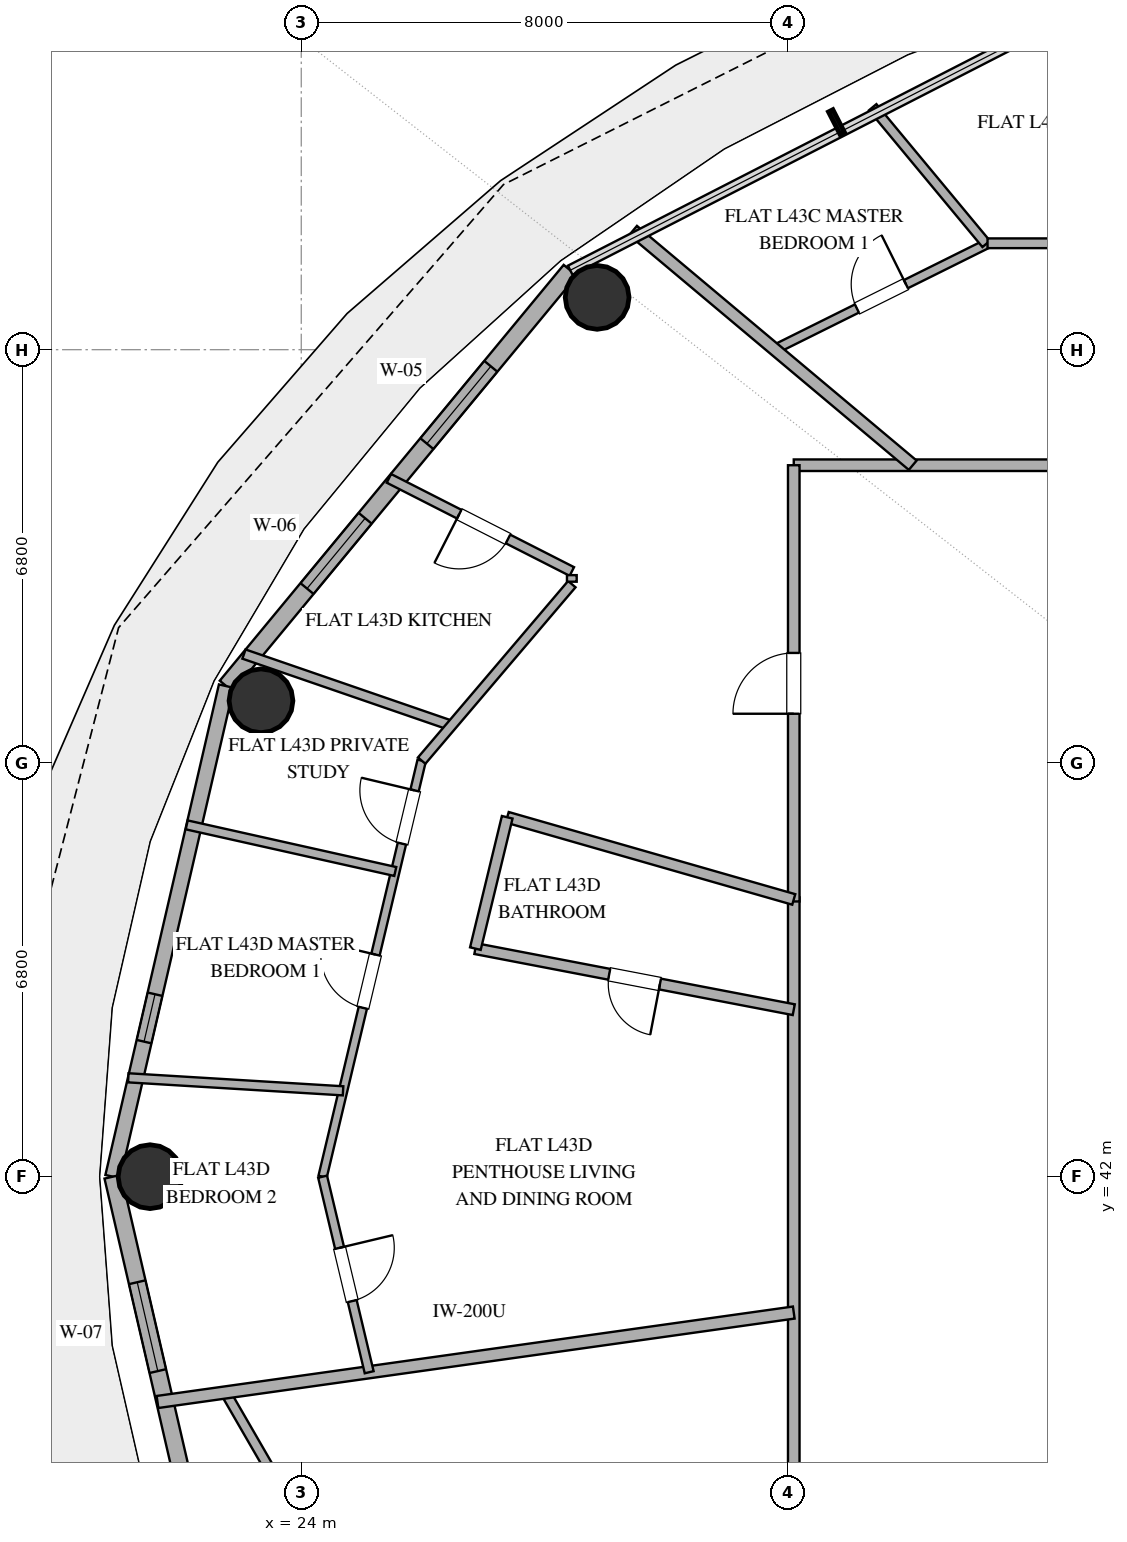
"""IFC4 building model, lengths in metres.
Left out: names, types, materials, properties, quantities, classifications, styles, units other than length and angle.
Written with IfcOpenShell. Run it as: python <this file> out.ifc"""

import sys

from ifc_helpers import new_model, si_unit, direction, frame, frame_2d, origin, origin_2d, place, context, subcontext, project, spatial, rectangle, hollow_circle, extrude, element, fill, save


model = new_model("IFC4")
c1 = context("Model", 3, precision=1e-05, world=origin(), true_north=direction((0.0, 1.0)))
c2 = subcontext(c1, "Body", "Model", "MODEL_VIEW")
j1 = project(units=[si_unit("LENGTHUNIT", "METRE"), si_unit("PLANEANGLEUNIT", "RADIAN")], contexts=[c1])
p1 = place(None, origin())
s1 = spatial("IfcSite", under=j1, at=p1, CompositionType="ELEMENT")
p2 = place(p1, origin())
s2 = spatial("IfcBuilding", under=s1, at=p2, CompositionType="ELEMENT")
p3 = place(p2, frame((0.0, 0.0, 172.2)))
s3 = spatial("IfcBuildingStorey", under=s2, at=p3, CompositionType="ELEMENT", Elevation=172.2)
for number, where, z_axis, x_axis in (
    (1, (28.866, 56.46, 0.0), (0.0, 0.0, 1.0), (1.0, 0.0, 0.0)),
    (2, (23.338, 49.826, 0.0), (0.0, 0.0, 1.0), (1.0, 0.0, 0.0)),
    (3, (21.513, 42.0, 0.0), (0.0, 0.0, 1.0), (1.0, 0.0, 0.0)),
):
    element("IfcColumn", number, at=place(p3, frame(where, z_axis=z_axis, x_axis=x_axis)), inside=s3, PredefinedType="COLUMN", context=c2, shape_type="SweptSolid", body=[
        extrude(hollow_circle(Radius=0.525, WallThickness=0.028, at=origin_2d()), origin(), (0.0, 0.0, 1.0), 3.38),
    ])
p4 = place(p3, frame((28.424, 56.906, 0.0), z_axis=(0.0, 0.0, 1.0), x_axis=(-0.637333477683, -0.770588111915, 0.0)))
e4 = element("IfcWall", 4, at=p4, inside=s3, PredefinedType="SOLIDWALL", context=c2, shape_type="SweptSolid", body=[
    extrude(rectangle(XDim=8.875, YDim=0.28, at=frame_2d((4.438, 0.0))), origin(), (0.0, 0.0, 1.0), 3.38),
])
p5 = place(p4, frame((2.049, 0.0, 0.85)))
e5 = element("IfcOpeningElement", 5, at=p5, cuts=e4, PredefinedType="OPENING", context=c2, shape_type="SweptSolid", body=[
    extrude(rectangle(XDim=1.65, YDim=2.0, at=frame_2d((0.825, 1.0))), frame((0.0, 0.15, 0.0), z_axis=(0.0, -1.0, 0.0), x_axis=(1.0, 0.0, 0.0)), (0.0, 0.0, 1.0), 0.3),
])
p6 = place(p4, frame((5.292, 0.0, 0.85)))
e6 = element("IfcOpeningElement", 6, at=p6, cuts=e4, PredefinedType="OPENING", context=c2, shape_type="SweptSolid", body=[
    extrude(rectangle(XDim=1.5, YDim=2.0, at=frame_2d((0.75, 1.0))), frame((0.0, 0.15, 0.0), z_axis=(0.0, -1.0, 0.0), x_axis=(1.0, 0.0, 0.0)), (0.0, 0.0, 1.0), 0.3),
])
p7 = place(p3, frame((22.768, 50.067, 0.0), z_axis=(0.0, 0.0, 1.0), x_axis=(-0.225473184558, -0.974249374157, 0.0)))
e7 = element("IfcWall", 7, at=p7, inside=s3, PredefinedType="SOLIDWALL", context=c2, shape_type="SweptSolid", body=[
    extrude(rectangle(XDim=8.28, YDim=0.25, at=frame_2d((4.14, 0.0))), origin(), (0.0, 0.0, 1.0), 3.38),
])
p8 = place(p7, frame((5.2, 0.0, 1.54)))
e8 = element("IfcOpeningElement", 8, at=p8, cuts=e7, PredefinedType="OPENING", context=c2, shape_type="SweptSolid", body=[
    extrude(rectangle(XDim=0.8, YDim=1.0, at=frame_2d((0.4, 0.5))), frame((0.0, 0.135, 0.0), z_axis=(0.0, -1.0, 0.0), x_axis=(1.0, 0.0, 0.0)), (0.0, 0.0, 1.0), 0.27),
])
p9 = place(p3, frame((20.901, 42.0, 0.0), z_axis=(0.0, 0.0, 1.0), x_axis=(0.225473184558, -0.974249374157, 0.0)))
e9 = element("IfcWall", 9, at=p9, inside=s3, PredefinedType="SOLIDWALL", context=c2, shape_type="SweptSolid", body=[
    extrude(rectangle(XDim=8.28, YDim=0.28, at=frame_2d((4.14, 0.0))), origin(), (0.0, 0.0, 1.0), 3.38),
])
p10 = place(p9, frame((1.782, 0.0, 0.85)))
e10 = element("IfcOpeningElement", 10, at=p10, cuts=e9, PredefinedType="OPENING", context=c2, shape_type="SweptSolid", body=[
    extrude(rectangle(XDim=1.5, YDim=1.8, at=frame_2d((0.75, 0.9))), frame((0.0, 0.15, 0.0), z_axis=(0.0, -1.0, 0.0), x_axis=(1.0, 0.0, 0.0)), (0.0, 0.0, 1.0), 0.3),
])
p11 = place(p9, frame((5.344, 0.0, 0.0)))
e11 = element("IfcOpeningElement", 11, at=p11, cuts=e9, PredefinedType="OPENING", context=c2, shape_type="SweptSolid", body=[
    extrude(rectangle(XDim=1.4, YDim=2.2, at=frame_2d((0.7, 1.1))), frame((0.0, 0.15, 0.0), z_axis=(0.0, -1.0, 0.0), x_axis=(1.0, 0.0, 0.0)), (0.0, 0.0, 1.0), 0.3),
])
p12 = place(p3, frame((32.1, 53.7, 0.0), z_axis=(0.0, 0.0, 1.0), x_axis=(1.0, 0.0, 0.0)))
e12 = element("IfcWall", 12, at=p12, inside=s3, PredefinedType="PARTITIONING", context=c2, shape_type="SweptSolid", body=[
    extrude(rectangle(XDim=16.061, YDim=0.19, at=frame_2d((8.03, 0.0))), origin(), (0.0, 0.0, 1.0), 2.74),
])
p13 = place(p12, frame((6.907, 0.0, 0.0)))
e13 = element("IfcOpeningElement", 13, at=p13, cuts=e12, PredefinedType="OPENING", context=c2, shape_type="SweptSolid", body=[
    extrude(rectangle(XDim=1.0, YDim=2.2, at=frame_2d((0.5, 1.1))), frame((0.0, 0.105, 0.0), z_axis=(0.0, -1.0, 0.0), x_axis=(1.0, 0.0, 0.0)), (0.0, 0.0, 1.0), 0.21),
])
p14 = place(p3, frame((22.753, 38.452, 0.0), z_axis=(0.0, 0.0, 1.0), x_axis=(0.500584533727, -0.865687659952, 0.0)))
e14 = element("IfcWall", 14, at=p14, inside=s3, PredefinedType="PLUMBINGWALL", context=c2, shape_type="SweptSolid", body=[
    extrude(rectangle(XDim=9.567, YDim=0.16, at=frame_2d((4.783, 0.0))), origin(), (0.0, 0.0, 1.0), 2.74),
])
p15 = place(p14, frame((5.233, 0.0, 0.0)))
e15 = element("IfcOpeningElement", 15, at=p15, cuts=e14, PredefinedType="OPENING", context=c2, shape_type="SweptSolid", body=[
    extrude(rectangle(XDim=0.9, YDim=2.1, at=frame_2d((0.45, 1.05))), frame((0.0, 0.09, 0.0), z_axis=(0.0, -1.0, 0.0), x_axis=(1.0, 0.0, 0.0)), (0.0, 0.0, 1.0), 0.18),
])
p16 = place(p3, frame((32.1, 46.593, 0.0), z_axis=(0.0, 0.0, 1.0), x_axis=(0.0, -1.0, 0.0)))
e16 = element("IfcWall", 16, at=p16, inside=s3, PredefinedType="PARTITIONING", context=c2, shape_type="SweptSolid", body=[
    extrude(rectangle(XDim=16.292, YDim=0.19, at=frame_2d((8.146, 0.0))), origin(), (0.0, 0.0, 1.0), 2.74),
])
p17 = place(p3, frame((32.1, 46.526, 0.0), z_axis=(0.0, 0.0, 1.0), x_axis=(0.0, 1.0, 0.0)))
e17 = element("IfcWall", 17, at=p17, inside=s3, PredefinedType="PARTITIONING", context=c2, shape_type="SweptSolid", body=[
    extrude(rectangle(XDim=7.174, YDim=0.19, at=frame_2d((3.587, 0.0))), origin(), (0.0, 0.0, 1.0), 2.74),
])
p18 = place(p17, frame((3.087, 0.0, 0.0)))
e18 = element("IfcOpeningElement", 18, at=p18, cuts=e17, PredefinedType="OPENING", context=c2, shape_type="SweptSolid", body=[
    extrude(rectangle(XDim=1.0, YDim=2.2, at=frame_2d((0.5, 1.1))), frame((0.0, 0.105, 0.0), z_axis=(0.0, -1.0, 0.0), x_axis=(1.0, 0.0, 0.0)), (0.0, 0.0, 1.0), 0.21),
])
p19 = place(p3, frame((21.635, 38.295, 0.0), z_axis=(0.0, 0.0, 1.0), x_axis=(0.990268074466, 0.139173060229, 0.0)))
e19 = element("IfcWall", 19, at=p19, inside=s3, PredefinedType="PARTITIONING", context=c2, shape_type="SweptSolid", body=[
    extrude(rectangle(XDim=10.567, YDim=0.2, at=frame_2d((5.284, 0.0))), origin(), (0.0, 0.0, 1.0), 2.74),
])
p20 = place(p3, frame((32.1, 44.746, 0.0), z_axis=(0.0, 0.0, 1.0), x_axis=(-0.982104947805, 0.188334467098, 0.0)))
e20 = element("IfcWall", 20, at=p20, inside=s3, PredefinedType="PLUMBINGWALL", context=c2, shape_type="SweptSolid", body=[
    extrude(rectangle(XDim=5.332, YDim=0.18, at=frame_2d((2.666, 0.0))), origin(), (0.0, 0.0, 1.0), 2.74),
])
p21 = place(p20, frame((2.241, 0.0, 0.0)))
e21 = element("IfcOpeningElement", 21, at=p21, cuts=e20, PredefinedType="OPENING", context=c2, shape_type="SweptSolid", body=[
    extrude(rectangle(XDim=0.85, YDim=2.1, at=frame_2d((0.425, 1.05))), frame((0.0, 0.1, 0.0), z_axis=(0.0, -1.0, 0.0), x_axis=(1.0, 0.0, 0.0)), (0.0, 0.0, 1.0), 0.2),
])
p22 = place(p3, frame((27.387, 47.911, 0.0), z_axis=(0.0, 0.0, 1.0), x_axis=(0.961266088446, -0.27562203686, 0.0)))
e22 = element("IfcWall", 22, at=p22, inside=s3, PredefinedType="PLUMBINGWALL", context=c2, shape_type="SweptSolid", body=[
    extrude(rectangle(XDim=4.903, YDim=0.18, at=frame_2d((2.451, 0.0))), origin(), (0.0, 0.0, 1.0), 2.74),
])
p23 = place(p3, frame((31.786, 55.605, 0.0), z_axis=(0.0, 0.0, 1.0), x_axis=(0.895458573673, 0.445144856013, 0.0)))
e23 = element("IfcWall", 23, at=p23, inside=s3, PredefinedType="PARTITIONING", context=c2, shape_type="SweptSolid", body=[
    extrude(rectangle(XDim=3.92, YDim=0.15, at=frame_2d((1.96, 0.0))), origin(), (0.0, 0.0, 1.0), 2.74),
])
p24 = place(p23, frame((1.51, 0.0, 0.0)))
e24 = element("IfcOpeningElement", 24, at=p24, cuts=e23, PredefinedType="OPENING", context=c2, shape_type="SweptSolid", body=[
    extrude(rectangle(XDim=0.9, YDim=2.1, at=frame_2d((0.45, 1.05))), frame((0.0, 0.085, 0.0), z_axis=(0.0, -1.0, 0.0), x_axis=(1.0, 0.0, 0.0)), (0.0, 0.0, 1.0), 0.17),
])
p25 = place(p3, frame((24.351, 42.0, 0.0), z_axis=(0.0, 0.0, 1.0), x_axis=(0.231658068135, 0.972797275627, 0.0)))
e25 = element("IfcWall", 25, at=p25, inside=s3, PredefinedType="PARTITIONING", context=c2, shape_type="SweptSolid", body=[
    extrude(rectangle(XDim=7.034, YDim=0.14, at=frame_2d((3.517, 0.0))), origin(), (0.0, 0.0, 1.0), 2.74),
])
p26 = place(p25, frame((2.855, 0.0, 0.0)))
e26 = element("IfcOpeningElement", 26, at=p26, cuts=e25, PredefinedType="OPENING", context=c2, shape_type="SweptSolid", body=[
    extrude(rectangle(XDim=0.9, YDim=2.1, at=frame_2d((0.45, 1.05))), frame((0.0, 0.08, 0.0), z_axis=(0.0, -1.0, 0.0), x_axis=(1.0, 0.0, 0.0)), (0.0, 0.0, 1.0), 0.16),
])
p27 = place(p25, frame((5.63, 0.0, 0.0)))
e27 = element("IfcOpeningElement", 27, at=p27, cuts=e25, PredefinedType="OPENING", context=c2, shape_type="SweptSolid", body=[
    extrude(rectangle(XDim=0.9, YDim=2.1, at=frame_2d((0.45, 1.05))), frame((0.0, 0.08, 0.0), z_axis=(0.0, -1.0, 0.0), x_axis=(1.0, 0.0, 0.0)), (0.0, 0.0, 1.0), 0.16),
])
p28 = place(p3, frame((26.471, 49.418, 0.0), z_axis=(0.0, 0.0, 1.0), x_axis=(-0.945442677411, 0.325788495392, 0.0)))
e28 = element("IfcWall", 28, at=p28, inside=s3, PredefinedType="PLUMBINGWALL", context=c2, shape_type="SweptSolid", body=[
    extrude(rectangle(XDim=3.61, YDim=0.16, at=frame_2d((1.805, 0.0))), origin(), (0.0, 0.0, 1.0), 2.74),
])
p29 = place(p3, frame((21.156, 43.626, 0.0), z_axis=(0.0, 0.0, 1.0), x_axis=(0.998171777701, -0.060440898408, 0.0)))
e29 = element("IfcWall", 29, at=p29, inside=s3, PredefinedType="PARTITIONING", context=c2, shape_type="SweptSolid", body=[
    extrude(rectangle(XDim=3.538, YDim=0.15, at=frame_2d((1.769, 0.0))), origin(), (0.0, 0.0, 1.0), 2.74),
])
p30 = place(p3, frame((25.546, 47.019, 0.0), z_axis=(0.0, 0.0, 1.0), x_axis=(-0.975921546644, 0.218121834754, 0.0)))
e30 = element("IfcWall", 30, at=p30, inside=s3, PredefinedType="PARTITIONING", context=c2, shape_type="SweptSolid", body=[
    extrude(rectangle(XDim=3.515, YDim=0.15, at=frame_2d((1.757, 0.0))), origin(), (0.0, 0.0, 1.0), 2.74),
])
p31 = place(p3, frame((28.45, 51.952, 0.0), z_axis=(0.0, 0.0, 1.0), x_axis=(-0.891148759763, 0.453711238535, 0.0)))
e31 = element("IfcWall", 31, at=p31, inside=s3, PredefinedType="PLUMBINGWALL", context=c2, shape_type="SweptSolid", body=[
    extrude(rectangle(XDim=3.375, YDim=0.16, at=frame_2d((1.688, 0.0))), origin(), (0.0, 0.0, 1.0), 2.74),
])
p32 = place(p31, frame((1.178, 0.0, 0.0)))
e32 = element("IfcOpeningElement", 32, at=p32, cuts=e31, PredefinedType="OPENING", context=c2, shape_type="SweptSolid", body=[
    extrude(rectangle(XDim=0.9, YDim=2.1, at=frame_2d((0.45, 1.05))), frame((0.0, 0.09, 0.0), z_axis=(0.0, -1.0, 0.0), x_axis=(1.0, 0.0, 0.0)), (0.0, 0.0, 1.0), 0.18),
])
p33 = place(p3, frame((24.351, 42.0, 0.0), z_axis=(0.0, 0.0, 1.0), x_axis=(0.231590575549, -0.972813345569, 0.0)))
e33 = element("IfcWall", 33, at=p33, inside=s3, PredefinedType="PARTITIONING", context=c2, shape_type="SweptSolid", body=[
    extrude(rectangle(XDim=3.306, YDim=0.15, at=frame_2d((1.653, 0.0))), origin(), (0.0, 0.0, 1.0), 2.74),
])
p34 = place(p33, frame((1.203, 0.0, 0.0)))
e34 = element("IfcOpeningElement", 34, at=p34, cuts=e33, PredefinedType="OPENING", context=c2, shape_type="SweptSolid", body=[
    extrude(rectangle(XDim=0.9, YDim=2.1, at=frame_2d((0.45, 1.05))), frame((0.0, 0.085, 0.0), z_axis=(0.0, -1.0, 0.0), x_axis=(1.0, 0.0, 0.0)), (0.0, 0.0, 1.0), 0.17),
])
p35 = place(p3, frame((25.981, 48.842, 0.0), z_axis=(0.0, 0.0, 1.0), x_axis=(0.648022171798, 0.761621470849, 0.0)))
e35 = element("IfcWall", 35, at=p35, inside=s3, PredefinedType="PLUMBINGWALL", context=c2, shape_type="SweptSolid", body=[
    extrude(rectangle(XDim=3.81, YDim=0.16, at=frame_2d((1.905, 0.0))), origin(), (0.0, 0.0, 1.0), 2.74),
])
p36 = place(p3, frame((34.056, 53.7, 0.0), z_axis=(0.0, 0.0, 1.0), x_axis=(-0.766037176398, 0.642796269728, 0.0)))
e36 = element("IfcWall", 36, at=p36, inside=s3, PredefinedType="PARTITIONING", context=c2, shape_type="SweptSolid", body=[
    extrude(rectangle(XDim=6.004, YDim=0.2, at=frame_2d((3.002, 0.0))), origin(), (0.0, 0.0, 1.0), 2.74),
])
p37 = place(p3, frame((35.264, 57.339, 0.0), z_axis=(0.0, 0.0, 1.0), x_axis=(-0.638753509407, 0.769411433643, 0.0)))
e37 = element("IfcWall", 37, at=p37, inside=s3, PredefinedType="PLUMBINGWALL", context=c2, shape_type="SweptSolid", body=[
    extrude(rectangle(XDim=2.922, YDim=0.16, at=frame_2d((1.461, 0.0))), origin(), (0.0, 0.0, 1.0), 2.74),
])
p38 = place(p3, frame((26.864, 45.75, 0.0), z_axis=(0.0, 0.0, 1.0), x_axis=(0.235499423966, 0.971874488456, 0.0)))
e38 = element("IfcWall", 38, at=p38, inside=s3, PredefinedType="PLUMBINGWALL", context=c2, shape_type="SweptSolid", body=[
    extrude(rectangle(XDim=2.223, YDim=0.18, at=frame_2d((1.111, 0.0))), origin(), (0.0, 0.0, 1.0), 2.74),
])
p39 = place(p3, frame((36.349, 57.35, 0.0), z_axis=(0.0, 0.0, 1.0), x_axis=(-1.0, 0.0, 0.0)))
e39 = element("IfcWall", 39, at=p39, inside=s3, PredefinedType="PLUMBINGWALL", context=c2, shape_type="SweptSolid", body=[
    extrude(rectangle(XDim=1.062, YDim=0.16, at=frame_2d((0.531, 0.0))), origin(), (0.0, 0.0, 1.0), 2.74),
])
p40 = place(p3, frame((28.45, 51.784, 0.0), z_axis=(0.0, 0.0, 1.0), x_axis=(0.0, 1.0, 0.0)))
e40 = element("IfcWall", 40, at=p40, inside=s3, PredefinedType="PLUMBINGWALL", context=c2, shape_type="SweptSolid", body=[
    extrude(rectangle(XDim=0.108, YDim=0.16, at=frame_2d((0.054, 0.0))), origin(), (0.0, 0.0, 1.0), 2.74),
])
p41 = place(p5, origin())
e41 = element("IfcWindow", 41, at=p41, inside=s3, PartitioningType="SINGLE_PANEL", PredefinedType="WINDOW", context=c2, shape_type="SweptSolid", body=[
    extrude(rectangle(XDim=1.65, YDim=2.0, at=frame_2d((0.825, 1.0))), frame((0.0, 0.03, 0.0), z_axis=(0.0, -1.0, 0.0), x_axis=(1.0, 0.0, 0.0)), (0.0, 0.0, 1.0), 0.06),
])
fill(e5, e41)
p42 = place(p6, origin())
e42 = element("IfcWindow", 42, at=p42, inside=s3, PartitioningType="SINGLE_PANEL", PredefinedType="WINDOW", context=c2, shape_type="SweptSolid", body=[
    extrude(rectangle(XDim=1.5, YDim=2.0, at=frame_2d((0.75, 1.0))), frame((0.0, 0.03, 0.0), z_axis=(0.0, -1.0, 0.0), x_axis=(1.0, 0.0, 0.0)), (0.0, 0.0, 1.0), 0.06),
])
fill(e6, e42)
p43 = place(p10, origin())
e43 = element("IfcWindow", 43, at=p43, inside=s3, PartitioningType="SINGLE_PANEL", PredefinedType="WINDOW", context=c2, shape_type="SweptSolid", body=[
    extrude(rectangle(XDim=1.5, YDim=1.8, at=frame_2d((0.75, 0.9))), frame((0.0, 0.03, 0.0), z_axis=(0.0, -1.0, 0.0), x_axis=(1.0, 0.0, 0.0)), (0.0, 0.0, 1.0), 0.06),
])
fill(e10, e43)
p44 = place(p8, origin())
e44 = element("IfcWindow", 44, at=p44, inside=s3, PartitioningType="SINGLE_PANEL", PredefinedType="WINDOW", context=c2, shape_type="SweptSolid", body=[
    extrude(rectangle(XDim=0.8, YDim=1.0, at=frame_2d((0.4, 0.5))), frame((0.0, 0.03, 0.0), z_axis=(0.0, -1.0, 0.0), x_axis=(1.0, 0.0, 0.0)), (0.0, 0.0, 1.0), 0.06),
])
fill(e8, e44)
p45 = place(p18, origin())
e45 = element("IfcDoor", 45, at=p45, inside=s3, OperationType="SINGLE_SWING_LEFT", PredefinedType="DOOR", context=c2, shape_type="SweptSolid", body=[
    extrude(rectangle(XDim=1.0, YDim=2.2, at=frame_2d((0.5, 1.1))), frame((0.0, 0.025, 0.0), z_axis=(0.0, -1.0, 0.0), x_axis=(1.0, 0.0, 0.0)), (0.0, 0.0, 1.0), 0.05),
])
fill(e18, e45)
p46 = place(p21, origin())
e46 = element("IfcDoor", 46, at=p46, inside=s3, OperationType="SINGLE_SWING_LEFT", PredefinedType="DOOR", context=c2, shape_type="SweptSolid", body=[
    extrude(rectangle(XDim=0.85, YDim=2.1, at=frame_2d((0.425, 1.05))), frame((0.0, 0.025, 0.0), z_axis=(0.0, -1.0, 0.0), x_axis=(1.0, 0.0, 0.0)), (0.0, 0.0, 1.0), 0.05),
])
fill(e21, e46)
p47 = place(p24, origin())
e47 = element("IfcDoor", 47, at=p47, inside=s3, OperationType="SINGLE_SWING_RIGHT", PredefinedType="DOOR", context=c2, shape_type="SweptSolid", body=[
    extrude(rectangle(XDim=0.9, YDim=2.1, at=frame_2d((0.45, 1.05))), frame((0.0, 0.025, 0.0), z_axis=(0.0, -1.0, 0.0), x_axis=(1.0, 0.0, 0.0)), (0.0, 0.0, 1.0), 0.05),
])
fill(e24, e47)
p48 = place(p26, origin())
e48 = element("IfcDoor", 48, at=p48, inside=s3, OperationType="SINGLE_SWING_RIGHT", PredefinedType="DOOR", context=c2, shape_type="SweptSolid", body=[
    extrude(rectangle(XDim=0.9, YDim=2.1, at=frame_2d((0.45, 1.05))), frame((0.0, 0.025, 0.0), z_axis=(0.0, -1.0, 0.0), x_axis=(1.0, 0.0, 0.0)), (0.0, 0.0, 1.0), 0.05),
])
fill(e26, e48)
p49 = place(p27, origin())
e49 = element("IfcDoor", 49, at=p49, inside=s3, OperationType="SINGLE_SWING_RIGHT", PredefinedType="DOOR", context=c2, shape_type="SweptSolid", body=[
    extrude(rectangle(XDim=0.9, YDim=2.1, at=frame_2d((0.45, 1.05))), frame((0.0, 0.025, 0.0), z_axis=(0.0, -1.0, 0.0), x_axis=(1.0, 0.0, 0.0)), (0.0, 0.0, 1.0), 0.05),
])
fill(e27, e49)
p50 = place(p32, origin())
e50 = element("IfcDoor", 50, at=p50, inside=s3, OperationType="SINGLE_SWING_RIGHT", PredefinedType="DOOR", context=c2, shape_type="SweptSolid", body=[
    extrude(rectangle(XDim=0.9, YDim=2.1, at=frame_2d((0.45, 1.05))), frame((0.0, 0.025, 0.0), z_axis=(0.0, -1.0, 0.0), x_axis=(1.0, 0.0, 0.0)), (0.0, 0.0, 1.0), 0.05),
])
fill(e32, e50)
p51 = place(p34, origin())
e51 = element("IfcDoor", 51, at=p51, inside=s3, OperationType="SINGLE_SWING_LEFT", PredefinedType="DOOR", context=c2, shape_type="SweptSolid", body=[
    extrude(rectangle(XDim=0.9, YDim=2.1, at=frame_2d((0.45, 1.05))), frame((0.0, 0.025, 0.0), z_axis=(0.0, -1.0, 0.0), x_axis=(1.0, 0.0, 0.0)), (0.0, 0.0, 1.0), 0.05),
])
fill(e34, e51)
save(model, sys.argv[1])
